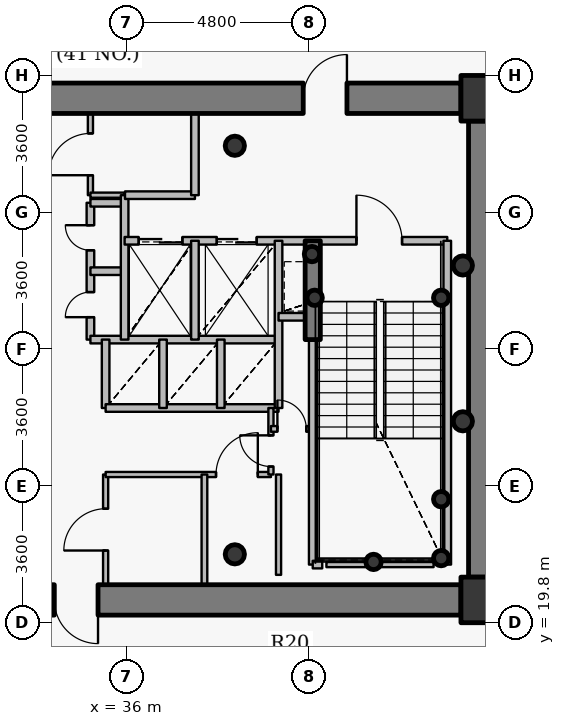
"""IFC4 building model, lengths in metres.
Left out: names, types, materials, properties, quantities, classifications, styles, units other than length and angle.
Written with IfcOpenShell. Run it as: python <this file> out.ifc"""

import sys

from ifc_helpers import new_model, si_unit, direction, frame, frame_2d, origin, origin_2d, place, context, subcontext, project, spatial, rectangle, hollow_circle, extrude, source, transform, mapped, element, fill, save


model = new_model("IFC4")
c1 = context("Model", 3, precision=1e-05, world=origin(), true_north=direction((0.0, 1.0)))
c2 = subcontext(c1, "Body", "Model", "MODEL_VIEW")
j1 = project(units=[si_unit("LENGTHUNIT", "METRE"), si_unit("PLANEANGLEUNIT", "RADIAN")], contexts=[c1])
p1 = place(None, origin())
s1 = spatial("IfcSite", under=j1, at=p1, CompositionType="ELEMENT")
p2 = place(p1, origin())
s2 = spatial("IfcBuilding", under=s1, at=p2, CompositionType="ELEMENT")
p3 = place(p2, frame((0.0, 0.0, 171.15)))
s3 = spatial("IfcBuildingStorey", under=s2, at=p3, CompositionType="ELEMENT", Elevation=171.15)
for number, where, z_axis, x_axis in (
    (1, (45.4, 20.4, 0.0), (0.0, 0.0, 1.0), (1.0, 0.0, 0.0)),
    (2, (45.4, 33.6, 0.0), (0.0, 0.0, 1.0), (1.0, 0.0, 0.0)),
):
    element("IfcColumn", number, at=place(p3, frame(where, z_axis=z_axis, x_axis=x_axis)), inside=s3, PredefinedType="COLUMN", context=c2, shape_type="SweptSolid", body=[
        extrude(rectangle(XDim=1.2, YDim=1.2, at=origin_2d()), origin(), (0.0, 0.0, 1.0), 3.75),
    ])
for number, where, z_axis, x_axis in (
    (3, (38.85, 21.6, 0.0), (0.0, 0.0, 1.0), (1.0, 0.0, 0.0)),
    (4, (38.85, 32.35, 0.0), (0.0, 0.0, 1.0), (1.0, 0.0, 0.0)),
):
    element("IfcColumn", number, at=place(p3, frame(where, z_axis=z_axis, x_axis=x_axis)), inside=s3, PredefinedType="COLUMN", context=c2, shape_type="SweptSolid", body=[
        extrude(hollow_circle(Radius=0.254, WallThickness=0.02, at=origin_2d()), origin(), (0.0, 0.0, 1.0), 3.75),
    ])
for number, where, z_axis, x_axis in (
    (5, (44.28, 21.5, 0.0), (0.0, 0.0, 1.0), (1.0, 0.0, 0.0)),
    (6, (44.28, 23.05, 0.0), (0.0, 0.0, 1.0), (1.0, 0.0, 0.0)),
    (7, (42.5, 21.4, 0.0), (0.0, 0.0, 1.0), (1.0, 0.0, 0.0)),
    (8, (40.95, 28.35, 0.0), (0.0, 0.0, 1.0), (1.0, 0.0, 0.0)),
    (9, (44.28, 28.35, 0.0), (0.0, 0.0, 1.0), (1.0, 0.0, 0.0)),
    (10, (40.88, 29.5, 0.0), (0.0, 0.0, 1.0), (1.0, 0.0, 0.0)),
):
    element("IfcColumn", number, at=place(p3, frame(where, z_axis=z_axis, x_axis=x_axis)), inside=s3, PredefinedType="COLUMN", context=c2, shape_type="SweptSolid", body=[
        extrude(hollow_circle(Radius=0.203, WallThickness=0.016, at=origin_2d()), origin(), (0.0, 0.0, 1.0), 3.75),
    ])
p4 = place(p3, frame((27.2, 33.6, 0.0), z_axis=(0.0, 0.0, 1.0), x_axis=(1.0, 0.0, 0.0)))
e11 = element("IfcWall", 11, at=p4, inside=s3, PredefinedType="SHEAR", context=c2, shape_type="SweptSolid", body=[
    extrude(rectangle(XDim=17.6, YDim=0.8, at=frame_2d((8.8, 0.0))), origin(), (0.0, 0.0, 1.0), 2.95),
])
p5 = place(p4, frame((13.45, 0.0, 0.0)))
e12 = element("IfcOpeningElement", 12, at=p5, cuts=e11, PredefinedType="OPENING", context=c2, shape_type="SweptSolid", body=[
    extrude(rectangle(XDim=1.15, YDim=2.15, at=origin_2d()), frame((0.575, 0.41, 1.075), z_axis=(0.0, -1.0, 0.0), x_axis=(1.0, 0.0, 0.0)), (0.0, 0.0, 1.0), 0.82),
])
p6 = place(p3, frame((45.4, 33.0, 0.0), z_axis=(0.0, 0.0, 1.0), x_axis=(0.0, -1.0, 0.0)))
e13 = element("IfcWall", 13, at=p6, inside=s3, PredefinedType="SHEAR", context=c2, shape_type="SweptSolid", body=[
    extrude(rectangle(XDim=12.0, YDim=0.8, at=frame_2d((6.0, 0.0))), origin(), (0.0, 0.0, 1.0), 2.95),
])
p7 = place(p3, frame((44.8, 20.4, 0.0), z_axis=(0.0, 0.0, 1.0), x_axis=(-1.0, 0.0, 0.0)))
e14 = element("IfcWall", 14, at=p7, inside=s3, PredefinedType="SHEAR", context=c2, shape_type="SweptSolid", body=[
    extrude(rectangle(XDim=17.6, YDim=0.8, at=frame_2d((8.8, 0.0))), origin(), (0.0, 0.0, 1.0), 2.95),
])
p8 = place(p7, frame((9.55, 0.0, 0.0)))
e15 = element("IfcOpeningElement", 15, at=p8, cuts=e14, PredefinedType="OPENING", context=c2, shape_type="SweptSolid", body=[
    extrude(rectangle(XDim=1.15, YDim=2.15, at=origin_2d()), frame((0.575, 0.41, 1.075), z_axis=(0.0, -1.0, 0.0), x_axis=(1.0, 0.0, 0.0)), (0.0, 0.0, 1.0), 0.82),
])
p9 = place(p3, frame((40.9, 27.25, 0.0), z_axis=(0.0, 0.0, 1.0), x_axis=(0.0, 1.0, 0.0)))
e16 = element("IfcWall", 16, at=p9, inside=s3, PredefinedType="SHEAR", context=c2, shape_type="SweptSolid", body=[
    extrude(rectangle(XDim=2.6, YDim=0.4, at=frame_2d((1.3, 0.0))), origin(), (0.0, 0.0, 1.0), 3.1),
])
for number, where, z_axis, x_axis in (
    (17, (44.85, 25.1, 0.0), (0.0, 0.0, 1.0), (1.0, 0.0, 0.0)),
    (18, (44.85, 29.2, 0.0), (0.0, 0.0, 1.0), (1.0, 0.0, 0.0)),
):
    element("IfcColumn", number, at=place(p3, frame(where, z_axis=z_axis, x_axis=x_axis)), inside=s3, PredefinedType="COLUMN", context=c2, shape_type="SweptSolid", body=[
        extrude(hollow_circle(Radius=0.254, WallThickness=0.02, at=origin_2d()), origin(), (0.0, 0.0, 1.0), 3.75),
    ])
p10 = place(p3, frame((35.05, 27.25, 0.0), z_axis=(0.0, 0.0, 1.0), x_axis=(0.0, 1.0, 0.0)))
e19 = element("IfcWall", 19, at=p10, inside=s3, PredefinedType="PARTITIONING", context=c2, shape_type="SweptSolid", body=[
    extrude(rectangle(XDim=3.6, YDim=0.2, at=frame_2d((1.8, 0.0))), origin(), (0.0, 0.0, 1.0), 3.5),
])
p11 = place(p10, frame((0.59, 0.0, 0.0)))
e20 = element("IfcOpeningElement", 20, at=p11, cuts=e19, PredefinedType="OPENING", context=c2, shape_type="SweptSolid", body=[
    extrude(rectangle(XDim=0.66, YDim=2.05, at=origin_2d()), frame((0.33, 0.11, 1.025), z_axis=(0.0, -1.0, 0.0), x_axis=(1.0, 0.0, 0.0)), (0.0, 0.0, 1.0), 0.22),
])
p12 = place(p10, frame((2.35, 0.0, 0.0)))
e21 = element("IfcOpeningElement", 21, at=p12, cuts=e19, PredefinedType="OPENING", context=c2, shape_type="SweptSolid", body=[
    extrude(rectangle(XDim=0.66, YDim=2.05, at=origin_2d()), frame((0.33, 0.11, 1.025), z_axis=(0.0, -1.0, 0.0), x_axis=(1.0, 0.0, 0.0)), (0.0, 0.0, 1.0), 0.22),
])
p13 = place(p3, frame((35.05, 27.25, 0.0), z_axis=(0.0, 0.0, 1.0), x_axis=(1.0, 0.0, 0.0)))
e22 = element("IfcWall", 22, at=p13, inside=s3, PredefinedType="PARTITIONING", context=c2, shape_type="SweptSolid", body=[
    extrude(rectangle(XDim=4.95, YDim=0.2, at=frame_2d((2.475, 0.0))), origin(), (0.0, 0.0, 1.0), 3.085),
])
for number, where, z_axis, x_axis in (
    (23, (35.05, 29.05, 0.0), (0.0, 0.0, 1.0), (1.0, 0.0, 0.0)),
    (24, (35.05, 30.85, 0.0), (0.0, 0.0, 1.0), (1.0, 0.0, 0.0)),
):
    element("IfcWall", number, at=place(p3, frame(where, z_axis=z_axis, x_axis=x_axis)), inside=s3, PredefinedType="PARTITIONING", context=c2, shape_type="SweptSolid", body=[
        extrude(rectangle(XDim=0.9, YDim=0.2, at=frame_2d((0.45, 0.0))), origin(), (0.0, 0.0, 1.0), 3.5),
    ])
p14 = place(p3, frame((35.05, 31.05, 0.0), z_axis=(0.0, 0.0, 1.0), x_axis=(0.0, 1.0, 0.0)))
e25 = element("IfcWall", 25, at=p14, inside=s3, PredefinedType="PARTITIONING", context=c2, shape_type="SweptSolid", body=[
    extrude(rectangle(XDim=2.15, YDim=0.135, at=frame_2d((1.075, 0.0))), origin(), (0.0, 0.0, 1.0), 3.085),
])
p15 = place(p14, frame((0.525, 0.0, 0.0)))
e26 = element("IfcOpeningElement", 26, at=p15, cuts=e25, PredefinedType="OPENING", context=c2, shape_type="SweptSolid", body=[
    extrude(rectangle(XDim=1.1, YDim=2.15, at=origin_2d()), frame((0.55, 0.078, 1.075), z_axis=(0.0, -1.0, 0.0), x_axis=(1.0, 0.0, 0.0)), (0.0, 0.0, 1.0), 0.155),
])
p16 = place(p3, frame((35.05, 31.05, 0.0), z_axis=(0.0, 0.0, 1.0), x_axis=(1.0, 0.0, 0.0)))
e27 = element("IfcWall", 27, at=p16, inside=s3, PredefinedType="PARTITIONING", context=c2, shape_type="SweptSolid", body=[
    extrude(rectangle(XDim=0.9, YDim=0.135, at=frame_2d((0.45, 0.0))), origin(), (0.0, 0.0, 1.0), 3.5),
])
p17 = place(p3, frame((35.45, 20.8, 0.0), z_axis=(0.0, 0.0, 1.0), x_axis=(0.0, 1.0, 0.0)))
e28 = element("IfcWall", 28, at=p17, inside=s3, PredefinedType="PARTITIONING", context=c2, shape_type="SweptSolid", body=[
    extrude(rectangle(XDim=2.9, YDim=0.135, at=frame_2d((1.45, 0.0))), origin(), (0.0, 0.0, 1.0), 3.085),
])
p18 = place(p17, frame((0.9, 0.0, 0.0)))
e29 = element("IfcOpeningElement", 29, at=p18, cuts=e28, PredefinedType="OPENING", context=c2, shape_type="SweptSolid", body=[
    extrude(rectangle(XDim=1.1, YDim=2.15, at=origin_2d()), frame((0.55, 0.078, 1.075), z_axis=(0.0, -1.0, 0.0), x_axis=(1.0, 0.0, 0.0)), (0.0, 0.0, 1.0), 0.155),
])
p19 = place(p3, frame((35.45, 23.7, 0.0), z_axis=(0.0, 0.0, 1.0), x_axis=(1.0, 0.0, 0.0)))
e30 = element("IfcWall", 30, at=p19, inside=s3, PredefinedType="PARTITIONING", context=c2, shape_type="SweptSolid", body=[
    extrude(rectangle(XDim=4.35, YDim=0.135, at=frame_2d((2.175, 0.0))), origin(), (0.0, 0.0, 1.0), 3.085),
])
p20 = place(p19, frame((2.905, 0.0, 0.0)))
e31 = element("IfcOpeningElement", 31, at=p20, cuts=e30, PredefinedType="OPENING", context=c2, shape_type="SweptSolid", body=[
    extrude(rectangle(XDim=1.1, YDim=2.15, at=origin_2d()), frame((0.55, 0.078, 1.075), z_axis=(0.0, -1.0, 0.0), x_axis=(1.0, 0.0, 0.0)), (0.0, 0.0, 1.0), 0.155),
])
p21 = place(p3, frame((35.45, 25.45, 0.0), z_axis=(0.0, 0.0, 1.0), x_axis=(0.0, 1.0, 0.0)))
e32 = element("IfcWall", 32, at=p21, inside=s3, PredefinedType="PARTITIONING", context=c2, shape_type="SweptSolid", body=[
    extrude(rectangle(XDim=1.8, YDim=0.2, at=frame_2d((0.9, 0.0))), origin(), (0.0, 0.0, 1.0), 3.5),
])
p22 = place(p3, frame((35.45, 25.45, 0.0), z_axis=(0.0, 0.0, 1.0), x_axis=(1.0, 0.0, 0.0)))
e33 = element("IfcWall", 33, at=p22, inside=s3, PredefinedType="PARTITIONING", context=c2, shape_type="SweptSolid", body=[
    extrude(rectangle(XDim=4.55, YDim=0.2, at=frame_2d((2.275, 0.0))), origin(), (0.0, 0.0, 1.0), 3.085),
])
p23 = place(p3, frame((35.95, 27.25, 0.0), z_axis=(0.0, 0.0, 1.0), x_axis=(0.0, 1.0, 0.0)))
e34 = element("IfcWall", 34, at=p23, inside=s3, PredefinedType="PARTITIONING", context=c2, shape_type="SweptSolid", body=[
    extrude(rectangle(XDim=3.8, YDim=0.2, at=frame_2d((1.9, 0.0))), origin(), (0.0, 0.0, 1.0), 3.5),
])
p24 = place(p3, frame((35.95, 29.85, 0.0), z_axis=(0.0, 0.0, 1.0), x_axis=(1.0, 0.0, 0.0)))
e35 = element("IfcWall", 35, at=p24, inside=s3, PredefinedType="PARTITIONING", context=c2, shape_type="SweptSolid", body=[
    extrude(rectangle(XDim=8.49, YDim=0.2, at=frame_2d((4.245, 0.0))), origin(), (0.0, 0.0, 1.0), 3.085),
])
p25 = place(p24, frame((6.1, 0.0, 0.0)))
e36 = element("IfcOpeningElement", 36, at=p25, cuts=e35, PredefinedType="OPENING", context=c2, shape_type="SweptSolid", body=[
    extrude(rectangle(XDim=1.2, YDim=2.15, at=origin_2d()), frame((0.6, 0.11, 1.075), z_axis=(0.0, -1.0, 0.0), x_axis=(1.0, 0.0, 0.0)), (0.0, 0.0, 1.0), 0.22),
])
p26 = place(p24, frame((0.37, 0.0, 0.0)))
e37 = element("IfcOpeningElement", 37, at=p26, cuts=e35, PredefinedType="OPENING", context=c2, shape_type="SweptSolid", body=[
    extrude(rectangle(XDim=1.15, YDim=2.15, at=origin_2d()), frame((0.575, 0.11, 1.075), z_axis=(0.0, -1.0, 0.0), x_axis=(1.0, 0.0, 0.0)), (0.0, 0.0, 1.0), 0.22),
])
p27 = place(p24, frame((2.425, 0.0, 0.0)))
e38 = element("IfcOpeningElement", 38, at=p27, cuts=e35, PredefinedType="OPENING", context=c2, shape_type="SweptSolid", body=[
    extrude(rectangle(XDim=1.05, YDim=2.15, at=origin_2d()), frame((0.525, 0.11, 1.075), z_axis=(0.0, -1.0, 0.0), x_axis=(1.0, 0.0, 0.0)), (0.0, 0.0, 1.0), 0.22),
])
p28 = place(p3, frame((35.96, 31.05, 0.0), z_axis=(0.0, 0.0, 1.0), x_axis=(1.0, 0.0, 0.0)))
e39 = element("IfcWall", 39, at=p28, inside=s3, PredefinedType="PARTITIONING", context=c2, shape_type="SweptSolid", body=[
    extrude(rectangle(XDim=1.84, YDim=0.2, at=frame_2d((0.92, 0.0))), origin(), (0.0, 0.0, 1.0), 3.5),
])
p29 = place(p3, frame((36.96, 25.45, 0.0), z_axis=(0.0, 0.0, 1.0), x_axis=(0.0, 1.0, 0.0)))
e40 = element("IfcWall", 40, at=p29, inside=s3, PredefinedType="PARTITIONING", context=c2, shape_type="SweptSolid", body=[
    extrude(rectangle(XDim=1.8, YDim=0.2, at=frame_2d((0.9, 0.0))), origin(), (0.0, 0.0, 1.0), 3.5),
])
p30 = place(p3, frame((37.8, 27.25, 0.0), z_axis=(0.0, 0.0, 1.0), x_axis=(0.0, 1.0, 0.0)))
e41 = element("IfcWall", 41, at=p30, inside=s3, PredefinedType="PARTITIONING", context=c2, shape_type="SweptSolid", body=[
    extrude(rectangle(XDim=2.6, YDim=0.2, at=frame_2d((1.3, 0.0))), origin(), (0.0, 0.0, 1.0), 3.5),
])
p31 = place(p3, frame((37.8, 31.05, 0.0), z_axis=(0.0, 0.0, 1.0), x_axis=(0.0, 1.0, 0.0)))
e42 = element("IfcWall", 42, at=p31, inside=s3, PredefinedType="PARTITIONING", context=c2, shape_type="SweptSolid", body=[
    extrude(rectangle(XDim=2.15, YDim=0.2, at=frame_2d((1.075, 0.0))), origin(), (0.0, 0.0, 1.0), 3.085),
])
p32 = place(p3, frame((38.05, 20.18, 0.0), z_axis=(0.0, 0.0, 1.0), x_axis=(0.0, 1.0, 0.0)))
e43 = element("IfcWall", 43, at=p32, inside=s3, PredefinedType="PARTITIONING", context=c2, shape_type="SweptSolid", body=[
    extrude(rectangle(XDim=3.52, YDim=0.15, at=frame_2d((1.76, 0.0))), origin(), (0.0, 0.0, 1.0), 2.935),
])
p33 = place(p3, frame((38.48, 25.45, 0.0), z_axis=(0.0, 0.0, 1.0), x_axis=(0.0, 1.0, 0.0)))
e44 = element("IfcWall", 44, at=p33, inside=s3, PredefinedType="PARTITIONING", context=c2, shape_type="SweptSolid", body=[
    extrude(rectangle(XDim=1.8, YDim=0.2, at=frame_2d((0.9, 0.0))), origin(), (0.0, 0.0, 1.0), 3.5),
])
p34 = place(p3, frame((39.8, 23.7, 0.0), z_axis=(0.0, 0.0, 1.0), x_axis=(0.0, 1.0, 0.0)))
e45 = element("IfcWall", 45, at=p34, inside=s3, PredefinedType="PARTITIONING", context=c2, shape_type="SweptSolid", body=[
    extrude(rectangle(XDim=1.75, YDim=0.135, at=frame_2d((0.875, 0.0))), origin(), (0.0, 0.0, 1.0), 3.5),
])
p35 = place(p34, frame((0.21, 0.0, 0.0)))
e46 = element("IfcOpeningElement", 46, at=p35, cuts=e45, PredefinedType="OPENING", context=c2, shape_type="SweptSolid", body=[
    extrude(rectangle(XDim=0.82, YDim=2.1, at=origin_2d()), frame((0.41, 0.078, 1.05), z_axis=(0.0, -1.0, 0.0), x_axis=(1.0, 0.0, 0.0)), (0.0, 0.0, 1.0), 0.155),
])
p36 = place(p3, frame((39.8, 24.9, 0.0), z_axis=(0.0, 0.0, 1.0), x_axis=(1.0, 0.0, 0.0)))
e47 = element("IfcWall", 47, at=p36, inside=s3, PredefinedType="PARTITIONING", context=c2, shape_type="SweptSolid", body=[
    extrude(rectangle(XDim=1.1, YDim=0.15, at=frame_2d((0.55, 0.0))), origin(), (0.0, 0.0, 1.0), 3.5),
])
p37 = place(p36, frame((0.17, 0.0, 0.0)))
e48 = element("IfcOpeningElement", 48, at=p37, cuts=e47, PredefinedType="OPENING", context=c2, shape_type="SweptSolid", body=[
    extrude(rectangle(XDim=0.76, YDim=2.1, at=origin_2d()), frame((0.38, 0.085, 1.05), z_axis=(0.0, -1.0, 0.0), x_axis=(1.0, 0.0, 0.0)), (0.0, 0.0, 1.0), 0.17),
])
p38 = place(p3, frame((40.0, 25.45, 0.0), z_axis=(0.0, 0.0, 1.0), x_axis=(0.0, 1.0, 0.0)))
e49 = element("IfcWall", 49, at=p38, inside=s3, PredefinedType="PARTITIONING", context=c2, shape_type="SweptSolid", body=[
    extrude(rectangle(XDim=4.4, YDim=0.2, at=frame_2d((2.2, 0.0))), origin(), (0.0, 0.0, 1.0), 3.5),
])
p39 = place(p3, frame((40.0, 27.85, 0.0), z_axis=(0.0, 0.0, 1.0), x_axis=(1.0, 0.0, 0.0)))
e50 = element("IfcWall", 50, at=p39, inside=s3, PredefinedType="PARTITIONING", context=c2, shape_type="SweptSolid", body=[
    extrude(rectangle(XDim=0.9, YDim=0.2, at=frame_2d((0.45, 0.0))), origin(), (0.0, 0.0, 1.0), 3.5),
])
p40 = place(p3, frame((40.9, 21.33, 0.0), z_axis=(0.0, 0.0, 1.0), x_axis=(0.0, 1.0, 0.0)))
e51 = element("IfcWall", 51, at=p40, inside=s3, PredefinedType="PARTITIONING", context=c2, shape_type="SweptSolid", body=[
    extrude(rectangle(XDim=5.91, YDim=0.2, at=frame_2d((2.955, 0.0))), origin(), (0.0, 0.0, 1.0), 3.035),
])
p41 = place(p3, frame((40.9, 21.33, 0.0), z_axis=(0.0, 0.0, 1.0), x_axis=(1.0, 0.0, 0.0)))
e52 = element("IfcWall", 52, at=p41, inside=s3, PredefinedType="PARTITIONING", context=c2, shape_type="SweptSolid", body=[
    extrude(rectangle(XDim=0.25, YDim=0.2, at=frame_2d((0.125, 0.0))), origin(), (0.0, 0.0, 1.0), 3.035),
])
p42 = place(p3, frame((44.44, 21.33, 0.0), z_axis=(0.0, 0.0, 1.0), x_axis=(0.0, 1.0, 0.0)))
e53 = element("IfcWall", 53, at=p42, inside=s3, PredefinedType="PARTITIONING", context=c2, shape_type="SweptSolid", body=[
    extrude(rectangle(XDim=8.52, YDim=0.2, at=frame_2d((4.26, 0.0))), origin(), (0.0, 0.0, 1.0), 3.5),
])
p43 = place(p3, frame((44.08, 21.33, 0.0), z_axis=(0.0, 0.0, 1.0), x_axis=(-1.0, 0.0, 0.0)))
e54 = element("IfcWall", 54, at=p43, inside=s3, PredefinedType="PARTITIONING", context=c2, shape_type="SweptSolid", body=[
    extrude(rectangle(XDim=2.82, YDim=0.135, at=frame_2d((1.41, 0.0))), origin(), (0.0, 0.0, 1.0), 3.035),
])
p44 = place(p3, frame((40.0, 23.7, 0.0), z_axis=(0.0, 0.0, 1.0), x_axis=(0.0, -1.0, 0.0)))
e55 = element("IfcWall", 55, at=p44, inside=s3, PredefinedType="PARTITIONING", context=c2, shape_type="SweptSolid", body=[
    extrude(rectangle(XDim=2.64, YDim=0.135, at=frame_2d((1.32, 0.0))), origin(), (0.0, 0.0, 1.0), 3.035),
])
for number, where, z_axis, x_axis in (
    (56, (45.79, 34.0, 0.0), (0.0, 0.0, 1.0), (-1.0, 0.0, 0.0)),
    (57, (44.81, 20.0, 0.0), (0.0, 0.0, 1.0), (1.0, 0.0, 0.0)),
):
    element("IfcWall", number, at=place(p3, frame(where, z_axis=z_axis, x_axis=x_axis)), inside=s3, PredefinedType="PARTITIONING", context=c2, shape_type="SweptSolid", body=[
        extrude(rectangle(XDim=0.98, YDim=0.135, at=frame_2d((0.49, 0.0))), origin(), (0.0, 0.0, 1.0), 2.935),
    ])
m1 = source(origin(), c2, "Body", "SweptSolid", [
    extrude(rectangle(XDim=1.15, YDim=2.15, at=origin_2d()), frame((0.575, 0.025, 1.075), z_axis=(0.0, -1.0, 0.0), x_axis=(1.0, 0.0, 0.0)), (0.0, 0.0, 1.0), 0.05),
])
p45 = place(p5, origin())
e58 = element("IfcDoor", 58, at=p45, inside=s3, OperationType="SINGLE_SWING_RIGHT", PredefinedType="DOOR", context=c2, shape_type="MappedRepresentation", body=[
    mapped(m1, transform((0.0, 0.0, 0.0), x_axis=(1.0, 0.0, 0.0), y_axis=(0.0, 1.0, 0.0), z_axis=(0.0, 0.0, 1.0), scale=1.0)),
])
fill(e12, e58)
p46 = place(p8, origin())
e59 = element("IfcDoor", 59, at=p46, inside=s3, OperationType="SINGLE_SWING_LEFT", PredefinedType="DOOR", context=c2, shape_type="MappedRepresentation", body=[
    mapped(m1, transform((0.0, 0.0, 0.0), x_axis=(1.0, 0.0, 0.0), y_axis=(0.0, 1.0, 0.0), z_axis=(0.0, 0.0, 1.0), scale=1.0)),
])
fill(e15, e59)
m2 = source(origin(), c2, "Body", "SweptSolid", [
    extrude(rectangle(XDim=1.2, YDim=2.15, at=origin_2d()), frame((0.6, 0.025, 1.075), z_axis=(0.0, -1.0, 0.0), x_axis=(1.0, 0.0, 0.0)), (0.0, 0.0, 1.0), 0.05),
])
p47 = place(p25, origin())
e60 = element("IfcDoor", 60, at=p47, inside=s3, OperationType="SINGLE_SWING_LEFT", PredefinedType="DOOR", context=c2, shape_type="MappedRepresentation", body=[
    mapped(m2, transform((0.0, 0.0, 0.0), x_axis=(1.0, 0.0, 0.0), y_axis=(0.0, 1.0, 0.0), z_axis=(0.0, 0.0, 1.0), scale=1.0)),
])
fill(e36, e60)
m3 = source(origin(), c2, "Body", "SweptSolid", [
    extrude(rectangle(XDim=1.15, YDim=2.15, at=origin_2d()), frame((0.575, 0.025, 1.075), z_axis=(0.0, -1.0, 0.0), x_axis=(1.0, 0.0, 0.0)), (0.0, 0.0, 1.0), 0.05),
])
p48 = place(p26, origin())
e61 = element("IfcDoor", 61, at=p48, inside=s3, OperationType="DOUBLE_DOOR_SLIDING", PredefinedType="USERDEFINED", context=c2, shape_type="MappedRepresentation", body=[
    mapped(m3, transform((0.0, 0.0, 0.0), x_axis=(1.0, 0.0, 0.0), y_axis=(0.0, 1.0, 0.0), z_axis=(0.0, 0.0, 1.0), scale=1.0)),
])
fill(e37, e61)
m4 = source(origin(), c2, "Body", "SweptSolid", [
    extrude(rectangle(XDim=1.05, YDim=2.15, at=origin_2d()), frame((0.525, 0.025, 1.075), z_axis=(0.0, -1.0, 0.0), x_axis=(1.0, 0.0, 0.0)), (0.0, 0.0, 1.0), 0.05),
])
p49 = place(p27, origin())
e62 = element("IfcDoor", 62, at=p49, inside=s3, OperationType="DOUBLE_DOOR_SLIDING", PredefinedType="USERDEFINED", context=c2, shape_type="MappedRepresentation", body=[
    mapped(m4, transform((0.0, 0.0, 0.0), x_axis=(1.0, 0.0, 0.0), y_axis=(0.0, 1.0, 0.0), z_axis=(0.0, 0.0, 1.0), scale=1.0)),
])
fill(e38, e62)
m5 = source(origin(), c2, "Body", "SweptSolid", [
    extrude(rectangle(XDim=0.66, YDim=2.05, at=origin_2d()), frame((0.33, 0.025, 1.025), z_axis=(0.0, -1.0, 0.0), x_axis=(1.0, 0.0, 0.0)), (0.0, 0.0, 1.0), 0.05),
])
p50 = place(p11, origin())
e63 = element("IfcDoor", 63, at=p50, inside=s3, OperationType="SINGLE_SWING_LEFT", PredefinedType="USERDEFINED", context=c2, shape_type="MappedRepresentation", body=[
    mapped(m5, transform((0.0, 0.0, 0.0), x_axis=(1.0, 0.0, 0.0), y_axis=(0.0, 1.0, 0.0), z_axis=(0.0, 0.0, 1.0), scale=1.0)),
])
fill(e20, e63)
p51 = place(p12, origin())
e64 = element("IfcDoor", 64, at=p51, inside=s3, OperationType="SINGLE_SWING_RIGHT", PredefinedType="USERDEFINED", context=c2, shape_type="MappedRepresentation", body=[
    mapped(m5, transform((0.0, 0.0, 0.0), x_axis=(1.0, 0.0, 0.0), y_axis=(0.0, 1.0, 0.0), z_axis=(0.0, 0.0, 1.0), scale=1.0)),
])
fill(e21, e64)
m6 = source(origin(), c2, "Body", "SweptSolid", [
    extrude(rectangle(XDim=1.1, YDim=2.15, at=origin_2d()), frame((0.55, 0.025, 1.075), z_axis=(0.0, -1.0, 0.0), x_axis=(1.0, 0.0, 0.0)), (0.0, 0.0, 1.0), 0.05),
])
p52 = place(p18, origin())
e65 = element("IfcDoor", 65, at=p52, inside=s3, OperationType="SINGLE_SWING_LEFT", PredefinedType="DOOR", context=c2, shape_type="MappedRepresentation", body=[
    mapped(m6, transform((0.0, 0.0, 0.0), x_axis=(1.0, 0.0, 0.0), y_axis=(0.0, 1.0, 0.0), z_axis=(0.0, 0.0, 1.0), scale=1.0)),
])
fill(e29, e65)
p53 = place(p20, origin())
e66 = element("IfcDoor", 66, at=p53, inside=s3, OperationType="SINGLE_SWING_RIGHT", PredefinedType="DOOR", context=c2, shape_type="MappedRepresentation", body=[
    mapped(m6, transform((0.0, 0.0, 0.0), x_axis=(1.0, 0.0, 0.0), y_axis=(0.0, 1.0, 0.0), z_axis=(0.0, 0.0, 1.0), scale=1.0)),
])
fill(e31, e66)
p54 = place(p15, origin())
e67 = element("IfcDoor", 67, at=p54, inside=s3, OperationType="SINGLE_SWING_LEFT", PredefinedType="DOOR", context=c2, shape_type="MappedRepresentation", body=[
    mapped(m6, transform((0.0, 0.0, 0.0), x_axis=(1.0, 0.0, 0.0), y_axis=(0.0, 1.0, 0.0), z_axis=(0.0, 0.0, 1.0), scale=1.0)),
])
fill(e26, e67)
m7 = source(origin(), c2, "Body", "SweptSolid", [
    extrude(rectangle(XDim=0.82, YDim=2.1, at=origin_2d()), frame((0.41, 0.025, 1.05), z_axis=(0.0, -1.0, 0.0), x_axis=(1.0, 0.0, 0.0)), (0.0, 0.0, 1.0), 0.05),
])
p55 = place(p35, origin())
e68 = element("IfcDoor", 68, at=p55, inside=s3, OperationType="SINGLE_SWING_RIGHT", PredefinedType="DOOR", context=c2, shape_type="MappedRepresentation", body=[
    mapped(m7, transform((0.0, 0.0, 0.0), x_axis=(1.0, 0.0, 0.0), y_axis=(0.0, 1.0, 0.0), z_axis=(0.0, 0.0, 1.0), scale=1.0)),
])
fill(e46, e68)
m8 = source(origin(), c2, "Body", "SweptSolid", [
    extrude(rectangle(XDim=0.76, YDim=2.1, at=origin_2d()), frame((0.38, 0.025, 1.05), z_axis=(0.0, -1.0, 0.0), x_axis=(1.0, 0.0, 0.0)), (0.0, 0.0, 1.0), 0.05),
])
p56 = place(p37, origin())
e69 = element("IfcDoor", 69, at=p56, inside=s3, OperationType="SINGLE_SWING_LEFT", PredefinedType="DOOR", context=c2, shape_type="MappedRepresentation", body=[
    mapped(m8, transform((0.0, 0.0, 0.0), x_axis=(1.0, 0.0, 0.0), y_axis=(0.0, 1.0, 0.0), z_axis=(0.0, 0.0, 1.0), scale=1.0)),
])
fill(e48, e69)
save(model, sys.argv[1])
